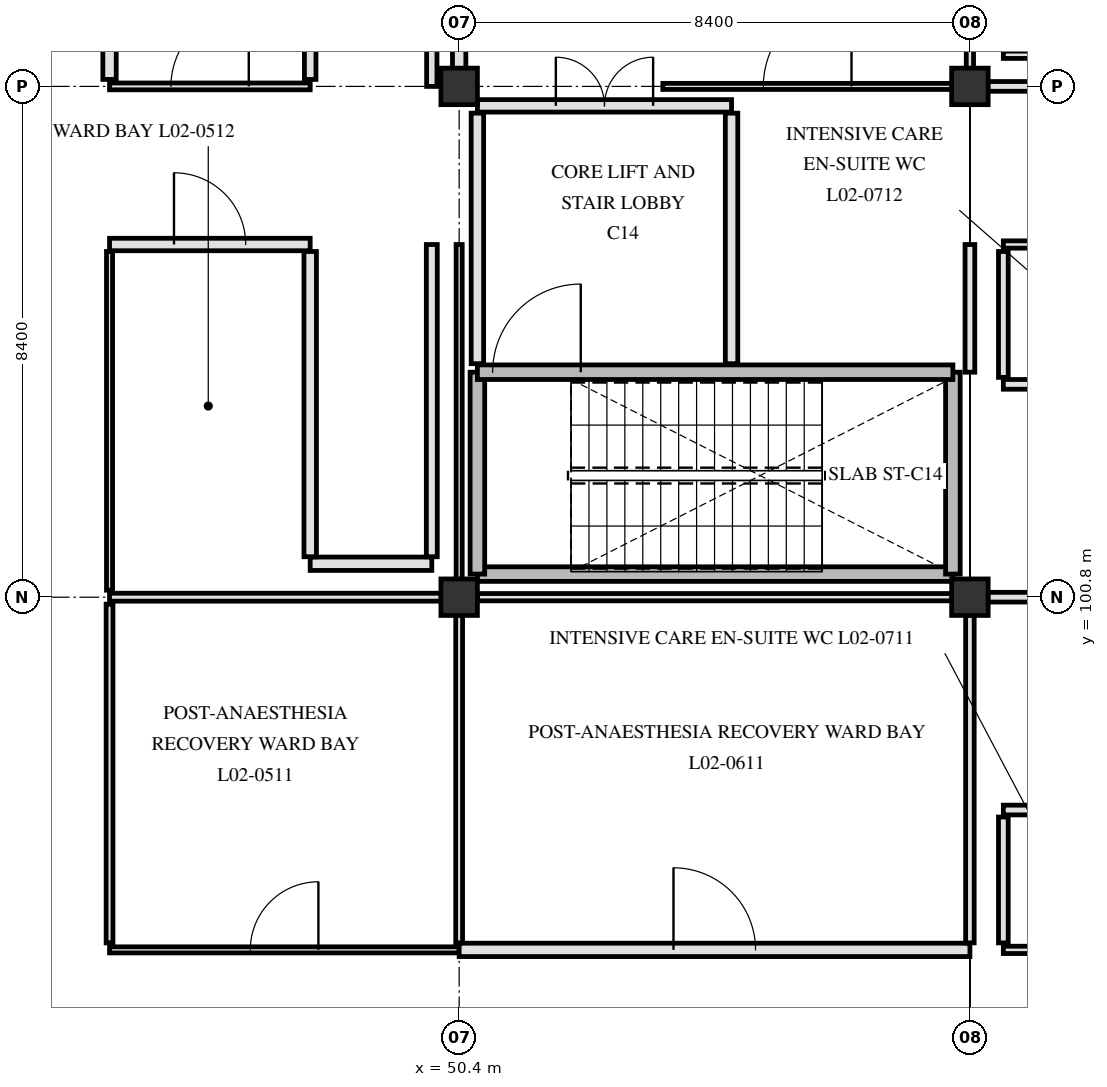
"""IFC4 building model, lengths in metres.
Left out: names, types, materials, properties, quantities, classifications, styles, units other than length and angle.
Written with IfcOpenShell. Run it as: python <this file> out.ifc"""

import sys

from ifc_helpers import new_model, si_unit, direction, frame, frame_2d, origin, origin_2d, place, context, subcontext, project, spatial, rectangle, extrude, element, fill, save


model = new_model("IFC4")
c1 = context("Model", 3, precision=1e-05, world=origin(), true_north=direction((0.0, 1.0)))
c2 = subcontext(c1, "Body", "Model", "MODEL_VIEW")
j1 = project(units=[si_unit("LENGTHUNIT", "METRE"), si_unit("PLANEANGLEUNIT", "RADIAN")], contexts=[c1])
p1 = place(None, origin())
s1 = spatial("IfcSite", under=j1, at=p1, CompositionType="ELEMENT")
p2 = place(p1, origin())
s2 = spatial("IfcBuilding", under=s1, at=p2, CompositionType="ELEMENT")
p3 = place(p2, frame((0.0, 0.0, 9.3)))
s3 = spatial("IfcBuildingStorey", under=s2, at=p3, CompositionType="ELEMENT", Elevation=9.3)
for number, where, z_axis, x_axis in (
    (1, (50.4, 100.8, 0.0), (0.0, 0.0, 1.0), (1.0, 0.0, 0.0)),
    (2, (50.4, 109.2, 0.0), (0.0, 0.0, 1.0), (1.0, 0.0, 0.0)),
    (3, (58.8, 100.8, 0.0), (0.0, 0.0, 1.0), (1.0, 0.0, 0.0)),
    (4, (58.8, 109.2, 0.0), (0.0, 0.0, 1.0), (1.0, 0.0, 0.0)),
):
    element("IfcColumn", number, at=place(p3, frame(where, z_axis=z_axis, x_axis=x_axis)), inside=s3, PredefinedType="COLUMN", context=c2, shape_type="SweptSolid", body=[
        extrude(rectangle(XDim=0.6, YDim=0.6, at=origin_2d()), origin(), (0.0, 0.0, 1.0), 5.1),
    ])
p4 = place(p3, frame((50.7, 101.18, 0.0), z_axis=(0.0, 0.0, 1.0), x_axis=(1.0, 0.0, 0.0)))
e5 = element("IfcWall", 5, at=p4, inside=s3, PredefinedType="SHEAR", context=c2, shape_type="SweptSolid", body=[
    extrude(rectangle(XDim=7.82, YDim=0.24, at=frame_2d((3.91, 0.0))), origin(), (0.0, 0.0, 1.0), 4.78),
])
for number, where, z_axis, x_axis in (
    (6, (50.7, 101.18, 0.0), (0.0, 0.0, 1.0), (0.0, 1.0, 0.0)),
    (7, (58.52, 101.18, 0.0), (0.0, 0.0, 1.0), (0.0, 1.0, 0.0)),
):
    element("IfcWall", number, at=place(p3, frame(where, z_axis=z_axis, x_axis=x_axis)), inside=s3, PredefinedType="SHEAR", context=c2, shape_type="SweptSolid", body=[
        extrude(rectangle(XDim=3.32, YDim=0.24, at=frame_2d((1.66, 0.0))), origin(), (0.0, 0.0, 1.0), 4.78),
    ])
p5 = place(p3, frame((50.7, 104.5, 0.0), z_axis=(0.0, 0.0, 1.0), x_axis=(1.0, 0.0, 0.0)))
e8 = element("IfcWall", 8, at=p5, inside=s3, PredefinedType="SHEAR", context=c2, shape_type="SweptSolid", body=[
    extrude(rectangle(XDim=7.82, YDim=0.24, at=frame_2d((3.91, 0.0))), origin(), (0.0, 0.0, 1.0), 4.78),
])
p6 = place(p5, frame((0.25, 0.0, 0.0)))
e9 = element("IfcOpeningElement", 9, at=p6, cuts=e8, PredefinedType="OPENING", context=c2, shape_type="SweptSolid", body=[
    extrude(rectangle(XDim=1.45, YDim=2.2, at=frame_2d((0.725, 1.1))), frame((0.0, 0.13, 0.0), z_axis=(0.0, -1.0, 0.0), x_axis=(1.0, 0.0, 0.0)), (0.0, 0.0, 1.0), 0.26),
])
p7 = place(p3, frame((54.88, 104.64, 0.0), z_axis=(0.0, 0.0, 1.0), x_axis=(0.0, 1.0, 0.0)))
e10 = element("IfcWall", 10, at=p7, inside=s3, PredefinedType="PARTITIONING", context=c2, shape_type="SweptSolid", body=[
    extrude(rectangle(XDim=4.12, YDim=0.205, at=frame_2d((2.06, 0.0))), origin(), (0.0, 0.0, 1.0), 4.77),
])
p8 = place(p3, frame((50.7, 104.64, 0.0), z_axis=(0.0, 0.0, 1.0), x_axis=(0.0, 1.0, 0.0)))
e11 = element("IfcWall", 11, at=p8, inside=s3, PredefinedType="PARTITIONING", context=c2, shape_type="SweptSolid", body=[
    extrude(rectangle(XDim=4.12, YDim=0.205, at=frame_2d((2.06, 0.0))), origin(), (0.0, 0.0, 1.0), 4.17),
])
p9 = place(p3, frame((50.7, 108.88, 0.0), z_axis=(0.0, 0.0, 1.0), x_axis=(1.0, 0.0, 0.0)))
e12 = element("IfcWall", 12, at=p9, inside=s3, PredefinedType="PARTITIONING", context=c2, shape_type="SweptSolid", body=[
    extrude(rectangle(XDim=4.18, YDim=0.205, at=frame_2d((2.09, 0.0))), origin(), (0.0, 0.0, 1.0), 4.02),
])
p10 = place(p9, frame((1.29, 0.0, 0.0)))
e13 = element("IfcOpeningElement", 13, at=p10, cuts=e12, PredefinedType="OPENING", context=c2, shape_type="SweptSolid", body=[
    extrude(rectangle(XDim=1.6, YDim=2.25, at=frame_2d((0.8, 1.125))), frame((0.0, 0.113, 0.0), z_axis=(0.0, -1.0, 0.0), x_axis=(1.0, 0.0, 0.0)), (0.0, 0.0, 1.0), 0.225),
])
p11 = place(p3, frame((44.65, 95.0, 0.0), z_axis=(0.0, 0.0, 1.0), x_axis=(1.0, 0.0, 0.0)))
e14 = element("IfcWall", 14, at=p11, inside=s3, PredefinedType="PARTITIONING", context=c2, shape_type="SweptSolid", body=[
    extrude(rectangle(XDim=5.75, YDim=0.1, at=frame_2d((2.875, 0.0))), origin(), (0.0, 0.0, 1.0), 4.17),
])
p12 = place(p11, frame((2.315, 0.0, 0.0)))
e15 = element("IfcOpeningElement", 15, at=p12, cuts=e14, PredefinedType="OPENING", context=c2, shape_type="SweptSolid", body=[
    extrude(rectangle(XDim=1.12, YDim=2.18, at=frame_2d((0.56, 1.09))), frame((0.0, 0.06, 0.0), z_axis=(0.0, -1.0, 0.0), x_axis=(1.0, 0.0, 0.0)), (0.0, 0.0, 1.0), 0.12),
])
p13 = place(p3, frame((50.4, 95.0, 0.0), z_axis=(0.0, 0.0, 1.0), x_axis=(1.0, 0.0, 0.0)))
e16 = element("IfcWall", 16, at=p13, inside=s3, PredefinedType="PARTITIONING", context=c2, shape_type="SweptSolid", body=[
    extrude(rectangle(XDim=8.4, YDim=0.22, at=frame_2d((4.2, 0.0))), origin(), (0.0, 0.0, 1.0), 4.17),
])
p14 = place(p13, frame((3.525, 0.0, 0.0)))
e17 = element("IfcOpeningElement", 17, at=p14, cuts=e16, PredefinedType="OPENING", context=c2, shape_type="SweptSolid", body=[
    extrude(rectangle(XDim=1.35, YDim=2.2, at=frame_2d((0.675, 1.1))), frame((0.0, 0.12, 0.0), z_axis=(0.0, -1.0, 0.0), x_axis=(1.0, 0.0, 0.0)), (0.0, 0.0, 1.0), 0.24),
])
p15 = place(p3, frame((59.35, 95.0, 0.0), z_axis=(0.0, 0.0, 1.0), x_axis=(1.0, 0.0, 0.0)))
e18 = element("IfcWall", 18, at=p15, inside=s3, PredefinedType="PARTITIONING", context=c2, shape_type="SweptSolid", body=[
    extrude(rectangle(XDim=2.9, YDim=0.12, at=frame_2d((1.45, 0.0))), origin(), (0.0, 0.0, 1.0), 4.77),
])
p16 = place(p3, frame((59.35, 97.3, 0.0), z_axis=(0.0, 0.0, 1.0), x_axis=(1.0, 0.0, 0.0)))
e19 = element("IfcWall", 19, at=p16, inside=s3, PredefinedType="PARTITIONING", context=c2, shape_type="SweptSolid", body=[
    extrude(rectangle(XDim=2.9, YDim=0.16, at=frame_2d((1.45, 0.0))), origin(), (0.0, 0.0, 1.0), 4.77),
])
p17 = place(p16, frame((0.975, 0.0, 0.0)))
e20 = element("IfcOpeningElement", 20, at=p17, cuts=e19, PredefinedType="OPENING", context=c2, shape_type="SweptSolid", body=[
    extrude(rectangle(XDim=0.95, YDim=2.1, at=frame_2d((0.475, 1.05))), frame((0.0, 0.09, 0.0), z_axis=(0.0, -1.0, 0.0), x_axis=(1.0, 0.0, 0.0)), (0.0, 0.0, 1.0), 0.18),
])
p18 = place(p3, frame((44.65, 100.8, 0.0), z_axis=(0.0, 0.0, 1.0), x_axis=(1.0, 0.0, 0.0)))
e21 = element("IfcWall", 21, at=p18, inside=s3, PredefinedType="PARTITIONING", context=c2, shape_type="SweptSolid", body=[
    extrude(rectangle(XDim=5.455, YDim=0.13, at=frame_2d((2.728, 0.0))), origin(), (0.0, 0.0, 1.0), 4.02),
])
p19 = place(p3, frame((50.695, 100.8, 0.0), z_axis=(0.0, 0.0, 1.0), x_axis=(1.0, 0.0, 0.0)))
e22 = element("IfcWall", 22, at=p19, inside=s3, PredefinedType="PARTITIONING", context=c2, shape_type="SweptSolid", body=[
    extrude(rectangle(XDim=7.81, YDim=0.12, at=frame_2d((3.905, 0.0))), origin(), (0.0, 0.0, 1.0), 4.02),
])
p20 = place(p3, frame((59.095, 100.8, 0.0), z_axis=(0.0, 0.0, 1.0), x_axis=(1.0, 0.0, 0.0)))
e23 = element("IfcWall", 23, at=p20, inside=s3, PredefinedType="PARTITIONING", context=c2, shape_type="SweptSolid", body=[
    extrude(rectangle(XDim=7.76, YDim=0.16, at=frame_2d((3.88, 0.0))), origin(), (0.0, 0.0, 1.0), 4.17),
])
p21 = place(p3, frame((47.95, 101.35, 0.0), z_axis=(0.0, 0.0, 1.0), x_axis=(1.0, 0.0, 0.0)))
e24 = element("IfcWall", 24, at=p21, inside=s3, PredefinedType="PARTITIONING", context=c2, shape_type="SweptSolid", body=[
    extrude(rectangle(XDim=2.0, YDim=0.22, at=frame_2d((1.0, 0.0))), origin(), (0.0, 0.0, 1.0), 4.77),
])
p22 = place(p3, frame((59.35, 104.3, 0.0), z_axis=(0.0, 0.0, 1.0), x_axis=(1.0, 0.0, 0.0)))
e25 = element("IfcWall", 25, at=p22, inside=s3, PredefinedType="PARTITIONING", context=c2, shape_type="SweptSolid", body=[
    extrude(rectangle(XDim=2.9, YDim=0.16, at=frame_2d((1.45, 0.0))), origin(), (0.0, 0.0, 1.0), 4.77),
])
p23 = place(p22, frame((0.975, 0.0, 0.0)))
e26 = element("IfcOpeningElement", 26, at=p23, cuts=e25, PredefinedType="OPENING", context=c2, shape_type="SweptSolid", body=[
    extrude(rectangle(XDim=0.95, YDim=2.1, at=frame_2d((0.475, 1.05))), frame((0.0, 0.09, 0.0), z_axis=(0.0, -1.0, 0.0), x_axis=(1.0, 0.0, 0.0)), (0.0, 0.0, 1.0), 0.18),
])
p24 = place(p3, frame((44.65, 106.6, 0.0), z_axis=(0.0, 0.0, 1.0), x_axis=(1.0, 0.0, 0.0)))
e27 = element("IfcWall", 27, at=p24, inside=s3, PredefinedType="PARTITIONING", context=c2, shape_type="SweptSolid", body=[
    extrude(rectangle(XDim=3.3, YDim=0.205, at=frame_2d((1.65, 0.0))), origin(), (0.0, 0.0, 1.0), 4.77),
])
p25 = place(p24, frame((1.06, 0.0, 0.0)))
e28 = element("IfcOpeningElement", 28, at=p25, cuts=e27, PredefinedType="OPENING", context=c2, shape_type="SweptSolid", body=[
    extrude(rectangle(XDim=1.18, YDim=2.18, at=frame_2d((0.59, 1.09))), frame((0.0, 0.113, 0.0), z_axis=(0.0, -1.0, 0.0), x_axis=(1.0, 0.0, 0.0)), (0.0, 0.0, 1.0), 0.225),
])
p26 = place(p3, frame((59.35, 106.6, 0.0), z_axis=(0.0, 0.0, 1.0), x_axis=(1.0, 0.0, 0.0)))
e29 = element("IfcWall", 29, at=p26, inside=s3, PredefinedType="PARTITIONING", context=c2, shape_type="SweptSolid", body=[
    extrude(rectangle(XDim=2.9, YDim=0.12, at=frame_2d((1.45, 0.0))), origin(), (0.0, 0.0, 1.0), 4.77),
])
p27 = place(p3, frame((44.65, 109.2, 0.0), z_axis=(0.0, 0.0, 1.0), x_axis=(1.0, 0.0, 0.0)))
e30 = element("IfcWall", 30, at=p27, inside=s3, PredefinedType="PARTITIONING", context=c2, shape_type="SweptSolid", body=[
    extrude(rectangle(XDim=3.3, YDim=0.112, at=frame_2d((1.65, 0.0))), origin(), (0.0, 0.0, 1.0), 4.02),
])
p28 = place(p27, frame((1.01, 0.0, 0.0)))
e31 = element("IfcOpeningElement", 31, at=p28, cuts=e30, PredefinedType="OPENING", context=c2, shape_type="SweptSolid", body=[
    extrude(rectangle(XDim=1.28, YDim=2.18, at=frame_2d((0.64, 1.09))), frame((0.0, 0.066, 0.0), z_axis=(0.0, -1.0, 0.0), x_axis=(1.0, 0.0, 0.0)), (0.0, 0.0, 1.0), 0.132),
])
p29 = place(p3, frame((53.75, 109.2, 0.0), z_axis=(0.0, 0.0, 1.0), x_axis=(1.0, 0.0, 0.0)))
e32 = element("IfcWall", 32, at=p29, inside=s3, PredefinedType="PARTITIONING", context=c2, shape_type="SweptSolid", body=[
    extrude(rectangle(XDim=4.755, YDim=0.1, at=frame_2d((2.377, 0.0))), origin(), (0.0, 0.0, 1.0), 4.02),
])
p30 = place(p29, frame((1.653, 0.0, 0.0)))
e33 = element("IfcOpeningElement", 33, at=p30, cuts=e32, PredefinedType="OPENING", context=c2, shape_type="SweptSolid", body=[
    extrude(rectangle(XDim=1.45, YDim=2.2, at=frame_2d((0.725, 1.1))), frame((0.0, 0.06, 0.0), z_axis=(0.0, -1.0, 0.0), x_axis=(1.0, 0.0, 0.0)), (0.0, 0.0, 1.0), 0.12),
])
p31 = place(p3, frame((59.095, 109.2, 0.0), z_axis=(0.0, 0.0, 1.0), x_axis=(1.0, 0.0, 0.0)))
e34 = element("IfcWall", 34, at=p31, inside=s3, PredefinedType="PARTITIONING", context=c2, shape_type="SweptSolid", body=[
    extrude(rectangle(XDim=7.76, YDim=0.16, at=frame_2d((3.88, 0.0))), origin(), (0.0, 0.0, 1.0), 4.17),
])
p32 = place(p31, frame((3.305, 0.0, 0.0)))
e35 = element("IfcOpeningElement", 35, at=p32, cuts=e34, PredefinedType="OPENING", context=c2, shape_type="SweptSolid", body=[
    extrude(rectangle(XDim=1.15, YDim=2.15, at=frame_2d((0.575, 1.075))), frame((0.0, 0.09, 0.0), z_axis=(0.0, -1.0, 0.0), x_axis=(1.0, 0.0, 0.0)), (0.0, 0.0, 1.0), 0.18),
])
p33 = place(p3, frame((59.35, 109.72, 0.0), z_axis=(0.0, 0.0, 1.0), x_axis=(1.0, 0.0, 0.0)))
e36 = element("IfcWall", 36, at=p33, inside=s3, PredefinedType="PARTITIONING", context=c2, shape_type="SweptSolid", body=[
    extrude(rectangle(XDim=2.9, YDim=0.12, at=frame_2d((1.45, 0.0))), origin(), (0.0, 0.0, 1.0), 4.77),
])
p34 = place(p3, frame((44.65, 95.115, 0.0), z_axis=(0.0, 0.0, 1.0), x_axis=(0.0, 1.0, 0.0)))
e37 = element("IfcWall", 37, at=p34, inside=s3, PredefinedType="PARTITIONING", context=c2, shape_type="SweptSolid", body=[
    extrude(rectangle(XDim=5.57, YDim=0.112, at=frame_2d((2.785, 0.0))), origin(), (0.0, 0.0, 1.0), 4.02),
])
p35 = place(p3, frame((44.65, 100.915, 0.0), z_axis=(0.0, 0.0, 1.0), x_axis=(0.0, 1.0, 0.0)))
e38 = element("IfcWall", 38, at=p35, inside=s3, PredefinedType="PARTITIONING", context=c2, shape_type="SweptSolid", body=[
    extrude(rectangle(XDim=5.57, YDim=0.1, at=frame_2d((2.785, 0.0))), origin(), (0.0, 0.0, 1.0), 4.02),
])
p36 = place(p3, frame((44.65, 109.315, 0.0), z_axis=(0.0, 0.0, 1.0), x_axis=(0.0, 1.0, 0.0)))
e39 = element("IfcWall", 39, at=p36, inside=s3, PredefinedType="PARTITIONING", context=c2, shape_type="SweptSolid", body=[
    extrude(rectangle(XDim=8.005, YDim=0.22, at=frame_2d((4.002, 0.0))), origin(), (0.0, 0.0, 1.0), 4.02),
])
p37 = place(p3, frame((47.95, 101.465, 0.0), z_axis=(0.0, 0.0, 1.0), x_axis=(0.0, 1.0, 0.0)))
e40 = element("IfcWall", 40, at=p37, inside=s3, PredefinedType="PARTITIONING", context=c2, shape_type="SweptSolid", body=[
    extrude(rectangle(XDim=5.02, YDim=0.205, at=frame_2d((2.51, 0.0))), origin(), (0.0, 0.0, 1.0), 4.77),
])
p38 = place(p3, frame((47.95, 109.315, 0.0), z_axis=(0.0, 0.0, 1.0), x_axis=(0.0, 1.0, 0.0)))
e41 = element("IfcWall", 41, at=p38, inside=s3, PredefinedType="PARTITIONING", context=c2, shape_type="SweptSolid", body=[
    extrude(rectangle(XDim=2.22, YDim=0.19, at=frame_2d((1.11, 0.0))), origin(), (0.0, 0.0, 1.0), 4.02),
])
p39 = place(p3, frame((49.95, 101.465, 0.0), z_axis=(0.0, 0.0, 1.0), x_axis=(0.0, 1.0, 0.0)))
e42 = element("IfcWall", 42, at=p39, inside=s3, PredefinedType="PARTITIONING", context=c2, shape_type="SweptSolid", body=[
    extrude(rectangle(XDim=5.135, YDim=0.18, at=frame_2d((2.567, 0.0))), origin(), (0.0, 0.0, 1.0), 4.77),
])
p40 = place(p3, frame((49.95, 109.2, 0.0), z_axis=(0.0, 0.0, 1.0), x_axis=(0.0, 1.0, 0.0)))
e43 = element("IfcWall", 43, at=p40, inside=s3, PredefinedType="PARTITIONING", context=c2, shape_type="SweptSolid", body=[
    extrude(rectangle(XDim=2.335, YDim=0.17, at=frame_2d((1.167, 0.0))), origin(), (0.0, 0.0, 1.0), 4.02),
])
p41 = place(p3, frame((50.4, 95.115, 0.0), z_axis=(0.0, 0.0, 1.0), x_axis=(0.0, 1.0, 0.0)))
e44 = element("IfcWall", 44, at=p41, inside=s3, PredefinedType="PARTITIONING", context=c2, shape_type="SweptSolid", body=[
    extrude(rectangle(XDim=5.39, YDim=0.112, at=frame_2d((2.695, 0.0))), origin(), (0.0, 0.0, 1.0), 4.17),
])
p42 = place(p3, frame((50.4, 101.095, 0.0), z_axis=(0.0, 0.0, 1.0), x_axis=(0.0, 1.0, 0.0)))
e45 = element("IfcWall", 45, at=p42, inside=s3, PredefinedType="PARTITIONING", context=c2, shape_type="SweptSolid", body=[
    extrude(rectangle(XDim=5.505, YDim=0.1, at=frame_2d((2.752, 0.0))), origin(), (0.0, 0.0, 1.0), 4.17),
])
p43 = place(p3, frame((50.4, 109.495, 0.0), z_axis=(0.0, 0.0, 1.0), x_axis=(0.0, 1.0, 0.0)))
e46 = element("IfcWall", 46, at=p43, inside=s3, PredefinedType="PARTITIONING", context=c2, shape_type="SweptSolid", body=[
    extrude(rectangle(XDim=7.81, YDim=0.22, at=frame_2d((3.905, 0.0))), origin(), (0.0, 0.0, 1.0), 4.17),
])
p44 = place(p3, frame((58.8, 95.115, 0.0), z_axis=(0.0, 0.0, 1.0), x_axis=(0.0, 1.0, 0.0)))
e47 = element("IfcWall", 47, at=p44, inside=s3, PredefinedType="PARTITIONING", context=c2, shape_type="SweptSolid", body=[
    extrude(rectangle(XDim=5.39, YDim=0.14, at=frame_2d((2.695, 0.0))), origin(), (0.0, 0.0, 1.0), 4.17),
])
p45 = place(p3, frame((58.8, 104.5, 0.0), z_axis=(0.0, 0.0, 1.0), x_axis=(0.0, 1.0, 0.0)))
e48 = element("IfcWall", 48, at=p45, inside=s3, PredefinedType="PARTITIONING", context=c2, shape_type="SweptSolid", body=[
    extrude(rectangle(XDim=2.1, YDim=0.16, at=frame_2d((1.05, 0.0))), origin(), (0.0, 0.0, 1.0), 4.17),
])
p46 = place(p3, frame((58.8, 109.495, 0.0), z_axis=(0.0, 0.0, 1.0), x_axis=(0.0, 1.0, 0.0)))
e49 = element("IfcWall", 49, at=p46, inside=s3, PredefinedType="PARTITIONING", context=c2, shape_type="SweptSolid", body=[
    extrude(rectangle(XDim=7.735, YDim=0.12, at=frame_2d((3.867, 0.0))), origin(), (0.0, 0.0, 1.0), 4.17),
])
for number, where, z_axis, x_axis in (
    (50, (59.35, 95.115, 0.0), (0.0, 0.0, 1.0), (0.0, 1.0, 0.0)),
    (51, (59.35, 104.415, 0.0), (0.0, 0.0, 1.0), (0.0, 1.0, 0.0)),
):
    element("IfcWall", number, at=place(p3, frame(where, z_axis=z_axis, x_axis=x_axis)), inside=s3, PredefinedType="PARTITIONING", context=c2, shape_type="SweptSolid", body=[
        extrude(rectangle(XDim=2.07, YDim=0.16, at=frame_2d((1.035, 0.0))), origin(), (0.0, 0.0, 1.0), 4.77),
    ])
p47 = place(p6, origin())
e52 = element("IfcDoor", 52, at=p47, inside=s3, OperationType="SINGLE_SWING_RIGHT", PredefinedType="DOOR", context=c2, shape_type="SweptSolid", body=[
    extrude(rectangle(XDim=1.45, YDim=2.2, at=frame_2d((0.725, 1.1))), frame((0.0, 0.025, 0.0), z_axis=(0.0, -1.0, 0.0), x_axis=(1.0, 0.0, 0.0)), (0.0, 0.0, 1.0), 0.05),
])
fill(e9, e52)
p48 = place(p10, origin())
e53 = element("IfcDoor", 53, at=p48, inside=s3, OperationType="DOUBLE_SWING_LEFT", PredefinedType="DOOR", context=c2, shape_type="SweptSolid", body=[
    extrude(rectangle(XDim=1.6, YDim=2.25, at=frame_2d((0.8, 1.125))), frame((0.0, 0.025, 0.0), z_axis=(0.0, -1.0, 0.0), x_axis=(1.0, 0.0, 0.0)), (0.0, 0.0, 1.0), 0.05),
])
fill(e13, e53)
p49 = place(p12, origin())
e54 = element("IfcDoor", 54, at=p49, inside=s3, OperationType="SINGLE_SWING_RIGHT", PredefinedType="DOOR", context=c2, shape_type="SweptSolid", body=[
    extrude(rectangle(XDim=1.12, YDim=2.18, at=frame_2d((0.56, 1.09))), frame((0.0, 0.025, 0.0), z_axis=(0.0, -1.0, 0.0), x_axis=(1.0, 0.0, 0.0)), (0.0, 0.0, 1.0), 0.05),
])
fill(e15, e54)
p50 = place(p25, origin())
e55 = element("IfcDoor", 55, at=p50, inside=s3, OperationType="SINGLE_SWING_LEFT", PredefinedType="DOOR", context=c2, shape_type="SweptSolid", body=[
    extrude(rectangle(XDim=1.18, YDim=2.18, at=frame_2d((0.59, 1.09))), frame((0.0, 0.025, 0.0), z_axis=(0.0, -1.0, 0.0), x_axis=(1.0, 0.0, 0.0)), (0.0, 0.0, 1.0), 0.05),
])
fill(e28, e55)
p51 = place(p28, origin())
e56 = element("IfcDoor", 56, at=p51, inside=s3, OperationType="SINGLE_SWING_RIGHT", PredefinedType="DOOR", context=c2, shape_type="SweptSolid", body=[
    extrude(rectangle(XDim=1.28, YDim=2.18, at=frame_2d((0.64, 1.09))), frame((0.0, 0.025, 0.0), z_axis=(0.0, -1.0, 0.0), x_axis=(1.0, 0.0, 0.0)), (0.0, 0.0, 1.0), 0.05),
])
fill(e31, e56)
p52 = place(p14, origin())
e57 = element("IfcDoor", 57, at=p52, inside=s3, OperationType="SINGLE_SWING_LEFT", PredefinedType="DOOR", context=c2, shape_type="SweptSolid", body=[
    extrude(rectangle(XDim=1.35, YDim=2.2, at=frame_2d((0.675, 1.1))), frame((0.0, 0.025, 0.0), z_axis=(0.0, -1.0, 0.0), x_axis=(1.0, 0.0, 0.0)), (0.0, 0.0, 1.0), 0.05),
])
fill(e17, e57)
p53 = place(p30, origin())
e58 = element("IfcDoor", 58, at=p53, inside=s3, OperationType="SINGLE_SWING_RIGHT", PredefinedType="DOOR", context=c2, shape_type="SweptSolid", body=[
    extrude(rectangle(XDim=1.45, YDim=2.2, at=frame_2d((0.725, 1.1))), frame((0.0, 0.025, 0.0), z_axis=(0.0, -1.0, 0.0), x_axis=(1.0, 0.0, 0.0)), (0.0, 0.0, 1.0), 0.05),
])
fill(e33, e58)
save(model, sys.argv[1])
